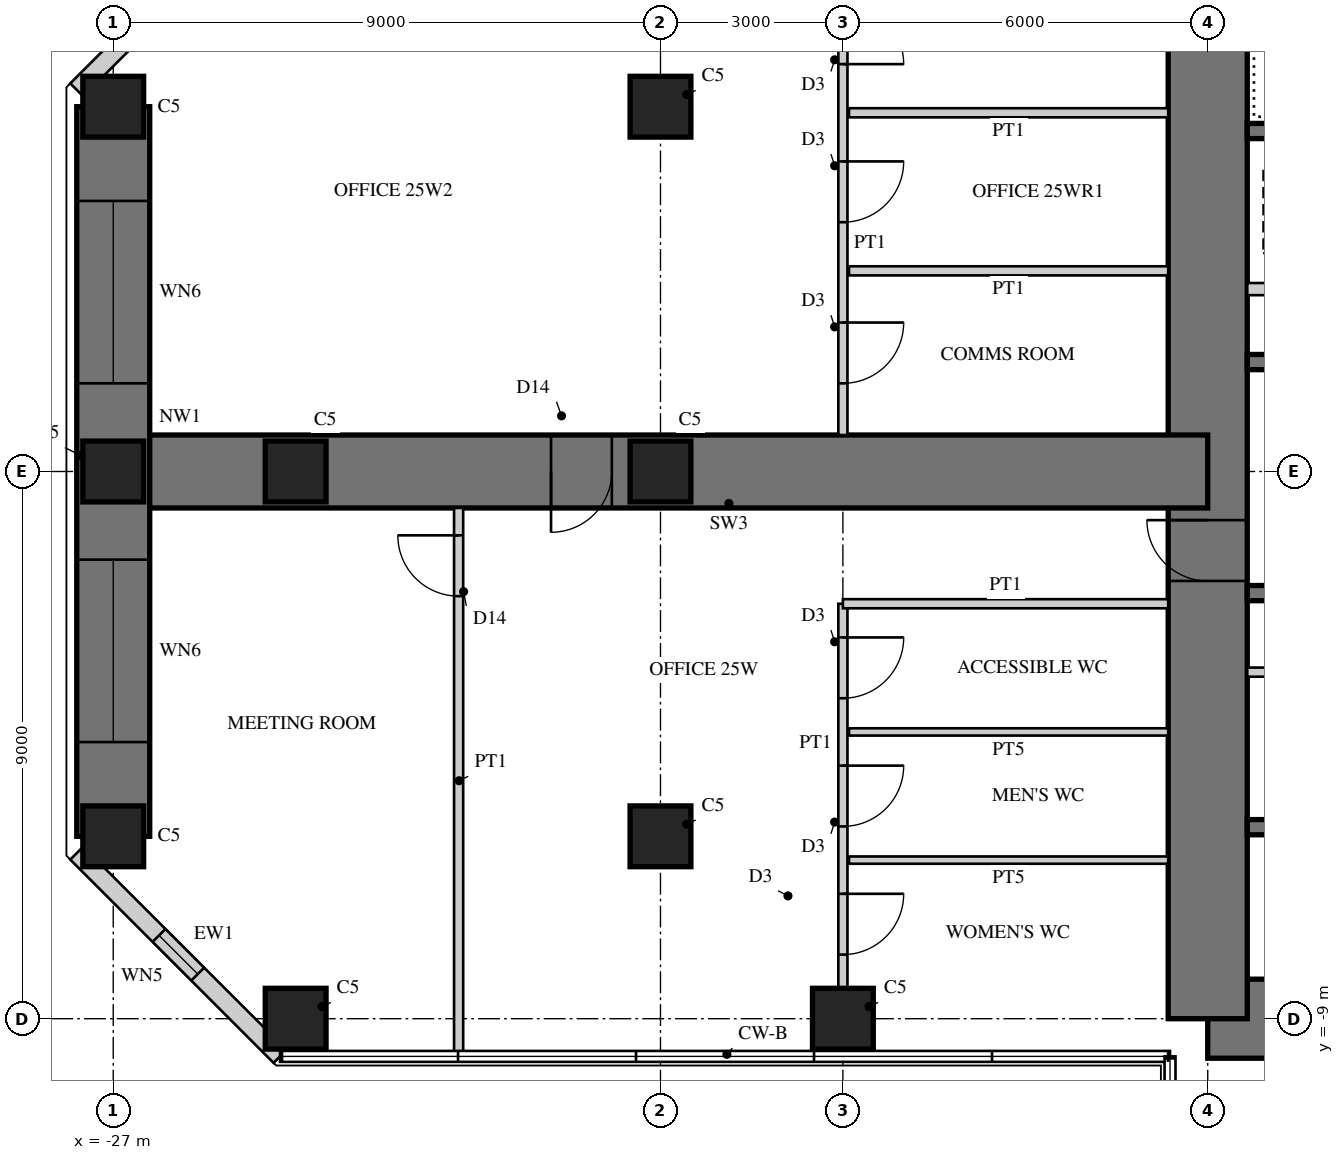
"""IFC4 building model, lengths in metres.
Left out: names, types, materials, properties, quantities, classifications, styles, units other than length and angle.
Written with IfcOpenShell. Run it as: python <this file> out.ifc"""

import sys

from ifc_helpers import new_model, si_unit, direction, frame, frame_2d, origin, origin_2d, place, context, subcontext, project, spatial, rectangle, hollow_rectangle, extrude, element, fill, save


model = new_model("IFC4")
c1 = context("Model", 3, precision=1e-05, world=origin(), true_north=direction((0.0, 1.0)))
c2 = subcontext(c1, "Body", "Model", "MODEL_VIEW")
j1 = project(units=[si_unit("LENGTHUNIT", "METRE"), si_unit("PLANEANGLEUNIT", "RADIAN")], contexts=[c1])
p1 = place(None, origin())
s1 = spatial("IfcSite", under=j1, at=p1, CompositionType="ELEMENT")
p2 = place(p1, origin())
s2 = spatial("IfcBuilding", under=s1, at=p2, CompositionType="ELEMENT")
p3 = place(p2, frame((0.0, 0.0, 104.5)))
s3 = spatial("IfcBuildingStorey", under=s2, at=p3, CompositionType="ELEMENT", Elevation=104.5)
p4 = place(p3, frame((-9.0, -9.0, 0.0), z_axis=(0.0, 0.0, 1.0), x_axis=(1.0, 0.0, 0.0)))
e1 = element("IfcWall", 1, at=p4, inside=s3, PredefinedType="SHEAR", context=c2, shape_type="SweptSolid", body=[
    extrude(rectangle(XDim=18.0, YDim=1.3, at=frame_2d((9.0, 0.0))), origin(), (0.0, 0.0, 1.0), 4.0),
])
p5 = place(p4, frame((9.8, 0.0, 0.0)))
e2 = element("IfcOpeningElement", 2, at=p5, cuts=e1, PredefinedType="OPENING", context=c2, shape_type="SweptSolid", body=[
    extrude(rectangle(XDim=1.0, YDim=2.4, at=frame_2d((0.5, 1.2))), frame((0.0, 0.66, 0.0), z_axis=(0.0, -1.0, 0.0), x_axis=(1.0, 0.0, 0.0)), (0.0, 0.0, 1.0), 1.32),
])
p6 = place(p3, frame((-9.0, 9.0, 0.0), z_axis=(0.0, 0.0, 1.0), x_axis=(0.0, -1.0, 0.0)))
e3 = element("IfcWall", 3, at=p6, inside=s3, PredefinedType="SHEAR", context=c2, shape_type="SweptSolid", body=[
    extrude(rectangle(XDim=18.0, YDim=1.3, at=frame_2d((9.0, 0.0))), origin(), (0.0, 0.0, 1.0), 4.0),
])
p7 = place(p6, frame((9.8, 0.0, 0.0)))
e4 = element("IfcOpeningElement", 4, at=p7, cuts=e3, PredefinedType="OPENING", context=c2, shape_type="SweptSolid", body=[
    extrude(rectangle(XDim=1.0, YDim=2.4, at=frame_2d((0.5, 1.2))), frame((0.0, 0.66, 0.0), z_axis=(0.0, -1.0, 0.0), x_axis=(1.0, 0.0, 0.0)), (0.0, 0.0, 1.0), 1.32),
])
p8 = place(p3, frame((-2.125, 1.8, 0.0), z_axis=(0.0, 0.0, 1.0), x_axis=(-1.0, 0.0, 0.0)))
e5 = element("IfcWall", 5, at=p8, inside=s3, PredefinedType="SHEAR", context=c2, shape_type="SweptSolid", body=[
    extrude(rectangle(XDim=6.225, YDim=0.25, at=frame_2d((3.113, 0.0))), origin(), (0.0, 0.0, 1.0), 4.0),
])
p9 = place(p3, frame((-2.125, 5.6, 0.0), z_axis=(0.0, 0.0, 1.0), x_axis=(-1.0, 0.0, 0.0)))
e6 = element("IfcWall", 6, at=p9, inside=s3, PredefinedType="SHEAR", context=c2, shape_type="SweptSolid", body=[
    extrude(rectangle(XDim=6.225, YDim=0.25, at=frame_2d((3.113, 0.0))), origin(), (0.0, 0.0, 1.0), 4.0),
])
p10 = place(p9, frame((0.175, 0.0, 0.0)))
e7 = element("IfcOpeningElement", 7, at=p10, cuts=e6, PredefinedType="OPENING", context=c2, shape_type="SweptSolid", body=[
    extrude(rectangle(XDim=1.0, YDim=2.1, at=frame_2d((0.5, 1.05))), frame((0.0, 0.135, 0.0), z_axis=(0.0, -1.0, 0.0), x_axis=(1.0, 0.0, 0.0)), (0.0, 0.0, 1.0), 0.27),
])
p11 = place(p3, frame((-5.725, 3.0, 0.0), z_axis=(0.0, 0.0, 1.0), x_axis=(-1.0, 0.0, 0.0)))
e8 = element("IfcWall", 8, at=p11, inside=s3, PredefinedType="PARTITIONING", context=c2, shape_type="SweptSolid", body=[
    extrude(rectangle(XDim=2.625, YDim=0.2, at=frame_2d((1.312, 0.0))), origin(), (0.0, 0.0, 1.0), 4.0),
])
for number, where, z_axis, x_axis in (
    (9, (-1.925, -2.0, 0.0), (0.0, 0.0, 1.0), (-1.0, 0.0, 0.0)),
    (10, (-1.925, -5.85, 0.0), (0.0, 0.0, 1.0), (-1.0, 0.0, 0.0)),
):
    element("IfcWall", number, at=place(p3, frame(where, z_axis=z_axis, x_axis=x_axis)), inside=s3, PredefinedType="SHEAR", context=c2, shape_type="SweptSolid", body=[
        extrude(rectangle(XDim=6.425, YDim=0.25, at=frame_2d((3.212, 0.0))), origin(), (0.0, 0.0, 1.0), 4.0),
    ])
p12 = place(p3, frame((-1.925, -3.3, 0.0), z_axis=(0.0, 0.0, 1.0), x_axis=(-1.0, 0.0, 0.0)))
e11 = element("IfcWall", 11, at=p12, inside=s3, PredefinedType="PARTITIONING", context=c2, shape_type="SweptSolid", body=[
    extrude(rectangle(XDim=6.425, YDim=0.15, at=frame_2d((3.212, 0.0))), origin(), (0.0, 0.0, 1.0), 4.0),
])
p13 = place(p12, frame((0.075, 0.0, 0.0)))
e12 = element("IfcOpeningElement", 12, at=p13, cuts=e11, PredefinedType="OPENING", context=c2, shape_type="SweptSolid", body=[
    extrude(rectangle(XDim=0.8, YDim=2.1, at=frame_2d((0.4, 1.05))), frame((0.0, 0.085, 0.0), z_axis=(0.0, -1.0, 0.0), x_axis=(1.0, 0.0, 0.0)), (0.0, 0.0, 1.0), 0.17),
])
p14 = place(p12, frame((3.675, 0.0, 0.0)))
e13 = element("IfcOpeningElement", 13, at=p14, cuts=e11, PredefinedType="OPENING", context=c2, shape_type="SweptSolid", body=[
    extrude(rectangle(XDim=0.8, YDim=2.1, at=frame_2d((0.4, 1.05))), frame((0.0, 0.085, 0.0), z_axis=(0.0, -1.0, 0.0), x_axis=(1.0, 0.0, 0.0)), (0.0, 0.0, 1.0), 0.17),
])
p15 = place(p3, frame((-9.0, 0.0, 0.0), z_axis=(0.0, 0.0, 1.0), x_axis=(-1.0, 0.0, 0.0)))
e14 = element("IfcWall", 14, at=p15, inside=s3, PredefinedType="SHEAR", context=c2, shape_type="SweptSolid", body=[
    extrude(rectangle(XDim=18.0, YDim=1.2, at=frame_2d((9.0, 0.0))), origin(), (0.0, 0.0, 1.0), 4.0),
])
p16 = place(p15, frame((9.8, 0.0, 0.0)))
e15 = element("IfcOpeningElement", 15, at=p16, cuts=e14, PredefinedType="OPENING", context=c2, shape_type="SweptSolid", body=[
    extrude(rectangle(XDim=1.0, YDim=2.2, at=frame_2d((0.5, 1.1))), frame((0.0, 0.61, 0.0), z_axis=(0.0, -1.0, 0.0), x_axis=(1.0, 0.0, 0.0)), (0.0, 0.0, 1.0), 1.22),
])
p17 = place(p3, frame((-27.0, 6.0, 0.0), z_axis=(0.0, 0.0, 1.0), x_axis=(0.0, -1.0, 0.0)))
e16 = element("IfcWall", 16, at=p17, inside=s3, PredefinedType="SHEAR", context=c2, shape_type="SweptSolid", body=[
    extrude(rectangle(XDim=12.0, YDim=1.2, at=frame_2d((6.0, 0.0))), origin(), (0.0, 0.0, 1.0), 4.0),
])
p18 = place(p17, frame((1.55, 0.0, 0.6)))
e17 = element("IfcOpeningElement", 17, at=p18, cuts=e16, PredefinedType="OPENING", context=c2, shape_type="SweptSolid", body=[
    extrude(rectangle(XDim=3.0, YDim=2.4, at=frame_2d((1.5, 1.2))), frame((0.0, 0.61, 0.0), z_axis=(0.0, -1.0, 0.0), x_axis=(1.0, 0.0, 0.0)), (0.0, 0.0, 1.0), 1.22),
])
p19 = place(p17, frame((7.45, 0.0, 0.6)))
e18 = element("IfcOpeningElement", 18, at=p19, cuts=e16, PredefinedType="OPENING", context=c2, shape_type="SweptSolid", body=[
    extrude(rectangle(XDim=3.0, YDim=2.4, at=frame_2d((1.5, 1.2))), frame((0.0, 0.61, 0.0), z_axis=(0.0, -1.0, 0.0), x_axis=(1.0, 0.0, 0.0)), (0.0, 0.0, 1.0), 1.22),
])
for number, where, z_axis, x_axis in (
    (19, (-15.0, -9.0, 0.0), (0.0, 0.0, 1.0), (1.0, 0.0, 0.0)),
    (20, (-24.0, -9.0, 0.0), (0.0, 0.0, 1.0), (1.0, 0.0, 0.0)),
    (21, (-27.0, 6.0, 0.0), (0.0, 0.0, 1.0), (1.0, 0.0, 0.0)),
    (22, (-27.0, 0.0, 0.0), (0.0, 0.0, 1.0), (1.0, 0.0, 0.0)),
    (23, (-27.0, -6.0, 0.0), (0.0, 0.0, 1.0), (1.0, 0.0, 0.0)),
    (24, (-18.0, 6.0, 0.0), (0.0, 0.0, 1.0), (1.0, 0.0, 0.0)),
    (25, (-18.0, 0.0, 0.0), (0.0, 0.0, 1.0), (1.0, 0.0, 0.0)),
    (26, (-18.0, -6.0, 0.0), (0.0, 0.0, 1.0), (1.0, 0.0, 0.0)),
    (27, (-24.0, 0.0, 0.0), (0.0, 0.0, 1.0), (1.0, 0.0, 0.0)),
):
    element("IfcColumn", number, at=place(p3, frame(where, z_axis=z_axis, x_axis=x_axis)), inside=s3, PredefinedType="COLUMN", context=c2, shape_type="SweptSolid", body=[
        extrude(rectangle(XDim=1.0, YDim=1.0, at=origin_2d()), origin(), (0.0, 0.0, 1.0), 4.0),
    ])
p20 = place(p3, frame((-24.257, 9.62, 0.0), z_axis=(0.0, 0.0, 1.0), x_axis=(-0.707106781187, -0.707106781187, 0.0)))
e28 = element("IfcWall", 28, at=p20, inside=s3, PredefinedType="SOLIDWALL", context=c2, shape_type="SweptSolid", body=[
    extrude(rectangle(XDim=4.728, YDim=0.3, at=frame_2d((2.364, 0.0))), origin(), (0.0, 0.0, 1.0), 3.8),
])
p21 = place(p20, frame((1.914, 0.0, 0.3)))
e29 = element("IfcOpeningElement", 29, at=p21, cuts=e28, PredefinedType="OPENING", context=c2, shape_type="SweptSolid", body=[
    extrude(rectangle(XDim=0.9, YDim=2.4, at=frame_2d((0.45, 1.2))), frame((0.0, 0.16, 0.0), z_axis=(0.0, -1.0, 0.0), x_axis=(1.0, 0.0, 0.0)), (0.0, 0.0, 1.0), 0.32),
])
p22 = place(p3, frame((-27.6, -6.277, 0.0), z_axis=(0.0, 0.0, 1.0), x_axis=(0.707106781187, -0.707106781187, 0.0)))
e30 = element("IfcWall", 30, at=p22, inside=s3, PredefinedType="SOLIDWALL", context=c2, shape_type="SweptSolid", body=[
    extrude(rectangle(XDim=4.728, YDim=0.3, at=frame_2d((2.364, 0.0))), origin(), (0.0, 0.0, 1.0), 3.8),
])
p23 = place(p22, frame((1.914, 0.0, 0.3)))
e31 = element("IfcOpeningElement", 31, at=p23, cuts=e30, PredefinedType="OPENING", context=c2, shape_type="SweptSolid", body=[
    extrude(rectangle(XDim=0.9, YDim=2.4, at=frame_2d((0.45, 1.2))), frame((0.0, 0.16, 0.0), z_axis=(0.0, -1.0, 0.0), x_axis=(1.0, 0.0, 0.0)), (0.0, 0.0, 1.0), 0.32),
])
p24 = place(p3, frame((-15.0, -2.175, 0.0), z_axis=(0.0, 0.0, 1.0), x_axis=(0.0, -1.0, 0.0)))
e32 = element("IfcWall", 32, at=p24, inside=s3, PredefinedType="PARTITIONING", context=c2, shape_type="SweptSolid", body=[
    extrude(rectangle(XDim=6.325, YDim=0.15, at=frame_2d((3.163, 0.0))), origin(), (0.0, 0.0, 1.0), 3.0),
])
p25 = place(p24, frame((0.554, 0.0, 0.0)))
e33 = element("IfcOpeningElement", 33, at=p25, cuts=e32, PredefinedType="OPENING", context=c2, shape_type="SweptSolid", body=[
    extrude(rectangle(XDim=1.0, YDim=2.1, at=frame_2d((0.5, 1.05))), frame((0.0, 0.085, 0.0), z_axis=(0.0, -1.0, 0.0), x_axis=(1.0, 0.0, 0.0)), (0.0, 0.0, 1.0), 0.17),
])
p26 = place(p24, frame((2.663, 0.0, 0.0)))
e34 = element("IfcOpeningElement", 34, at=p26, cuts=e32, PredefinedType="OPENING", context=c2, shape_type="SweptSolid", body=[
    extrude(rectangle(XDim=1.0, YDim=2.1, at=frame_2d((0.5, 1.05))), frame((0.0, 0.085, 0.0), z_axis=(0.0, -1.0, 0.0), x_axis=(1.0, 0.0, 0.0)), (0.0, 0.0, 1.0), 0.17),
])
p27 = place(p24, frame((4.771, 0.0, 0.0)))
e35 = element("IfcOpeningElement", 35, at=p27, cuts=e32, PredefinedType="OPENING", context=c2, shape_type="SweptSolid", body=[
    extrude(rectangle(XDim=1.0, YDim=2.1, at=frame_2d((0.5, 1.05))), frame((0.0, 0.085, 0.0), z_axis=(0.0, -1.0, 0.0), x_axis=(1.0, 0.0, 0.0)), (0.0, 0.0, 1.0), 0.17),
])
p28 = place(p3, frame((-9.65, -2.175, 0.0), z_axis=(0.0, 0.0, 1.0), x_axis=(-1.0, 0.0, 0.0)))
e36 = element("IfcWall", 36, at=p28, inside=s3, PredefinedType="PARTITIONING", context=c2, shape_type="SweptSolid", body=[
    extrude(rectangle(XDim=5.35, YDim=0.15, at=frame_2d((2.675, 0.0))), origin(), (0.0, 0.0, 1.0), 3.8),
])
for number, where, z_axis, x_axis in (
    (37, (-9.65, -4.283, 0.0), (0.0, 0.0, 1.0), (-1.0, 0.0, 0.0)),
    (38, (-9.65, -6.392, 0.0), (0.0, 0.0, 1.0), (-1.0, 0.0, 0.0)),
):
    element("IfcWall", number, at=place(p3, frame(where, z_axis=z_axis, x_axis=x_axis)), inside=s3, PredefinedType="PLUMBINGWALL", context=c2, shape_type="SweptSolid", body=[
        extrude(rectangle(XDim=5.25, YDim=0.12, at=frame_2d((2.625, 0.0))), origin(), (0.0, 0.0, 1.0), 3.8),
    ])
p29 = place(p3, frame((-15.0, 8.5, 0.0), z_axis=(0.0, 0.0, 1.0), x_axis=(0.0, -1.0, 0.0)))
e39 = element("IfcWall", 39, at=p29, inside=s3, PredefinedType="PARTITIONING", context=c2, shape_type="SweptSolid", body=[
    extrude(rectangle(XDim=7.9, YDim=0.15, at=frame_2d((3.95, 0.0))), origin(), (0.0, 0.0, 1.0), 3.0),
])
p30 = place(p29, frame((0.8, 0.0, 0.0)))
e40 = element("IfcOpeningElement", 40, at=p30, cuts=e39, PredefinedType="OPENING", context=c2, shape_type="SweptSolid", body=[
    extrude(rectangle(XDim=1.0, YDim=2.1, at=frame_2d((0.5, 1.05))), frame((0.0, 0.085, 0.0), z_axis=(0.0, -1.0, 0.0), x_axis=(1.0, 0.0, 0.0)), (0.0, 0.0, 1.0), 0.17),
])
p31 = place(p29, frame((3.4, 0.0, 0.0)))
e41 = element("IfcOpeningElement", 41, at=p31, cuts=e39, PredefinedType="OPENING", context=c2, shape_type="SweptSolid", body=[
    extrude(rectangle(XDim=1.0, YDim=2.1, at=frame_2d((0.5, 1.05))), frame((0.0, 0.085, 0.0), z_axis=(0.0, -1.0, 0.0), x_axis=(1.0, 0.0, 0.0)), (0.0, 0.0, 1.0), 0.17),
])
p32 = place(p29, frame((6.05, 0.0, 0.0)))
e42 = element("IfcOpeningElement", 42, at=p32, cuts=e39, PredefinedType="OPENING", context=c2, shape_type="SweptSolid", body=[
    extrude(rectangle(XDim=1.0, YDim=2.1, at=frame_2d((0.5, 1.05))), frame((0.0, 0.085, 0.0), z_axis=(0.0, -1.0, 0.0), x_axis=(1.0, 0.0, 0.0)), (0.0, 0.0, 1.0), 0.17),
])
p33 = place(p3, frame((-9.65, 3.3, 0.0), z_axis=(0.0, 0.0, 1.0), x_axis=(-1.0, 0.0, 0.0)))
e43 = element("IfcWall", 43, at=p33, inside=s3, PredefinedType="PARTITIONING", context=c2, shape_type="SweptSolid", body=[
    extrude(rectangle(XDim=5.25, YDim=0.15, at=frame_2d((2.625, 0.0))), origin(), (0.0, 0.0, 1.0), 3.8),
])
p34 = place(p3, frame((-9.65, 5.9, 0.0), z_axis=(0.0, 0.0, 1.0), x_axis=(-1.0, 0.0, 0.0)))
e44 = element("IfcWall", 44, at=p34, inside=s3, PredefinedType="PARTITIONING", context=c2, shape_type="SweptSolid", body=[
    extrude(rectangle(XDim=5.25, YDim=0.15, at=frame_2d((2.625, 0.0))), origin(), (0.0, 0.0, 1.0), 3.1),
])
p35 = place(p3, frame((-21.32, -0.6, 0.0), z_axis=(0.0, 0.0, 1.0), x_axis=(0.0, -1.0, 0.0)))
e45 = element("IfcWall", 45, at=p35, inside=s3, PredefinedType="PARTITIONING", context=c2, shape_type="SweptSolid", body=[
    extrude(rectangle(XDim=8.98, YDim=0.15, at=frame_2d((4.49, 0.0))), origin(), (0.0, 0.0, 1.0), 3.8),
])
p36 = place(p35, frame((0.45, 0.0, 0.0)))
e46 = element("IfcOpeningElement", 46, at=p36, cuts=e45, PredefinedType="OPENING", context=c2, shape_type="SweptSolid", body=[
    extrude(rectangle(XDim=1.0, YDim=2.2, at=frame_2d((0.5, 1.1))), frame((0.0, 0.085, 0.0), z_axis=(0.0, -1.0, 0.0), x_axis=(1.0, 0.0, 0.0)), (0.0, 0.0, 1.0), 0.17),
])
p37 = place(p18, origin())
e47 = element("IfcWindow", 47, at=p37, inside=s3, PartitioningType="SINGLE_PANEL", PredefinedType="WINDOW", context=c2, shape_type="SweptSolid", body=[
    extrude(hollow_rectangle(XDim=3.0, YDim=2.4, WallThickness=0.06, at=frame_2d((1.5, 1.2))), frame((0.0, 0.03, 0.0), z_axis=(0.0, -1.0, 0.0), x_axis=(1.0, 0.0, 0.0)), (0.0, 0.0, 1.0), 0.06),
    extrude(rectangle(XDim=2.879, YDim=2.279, at=frame_2d((1.5, 1.2))), frame((0.0, 0.03, 0.0), z_axis=(0.0, -1.0, 0.0), x_axis=(1.0, 0.0, 0.0)), (0.0, 0.0, 1.0), 0.06),
])
fill(e17, e47)
p38 = place(p19, origin())
e48 = element("IfcWindow", 48, at=p38, inside=s3, PartitioningType="SINGLE_PANEL", PredefinedType="WINDOW", context=c2, shape_type="SweptSolid", body=[
    extrude(hollow_rectangle(XDim=3.0, YDim=2.4, WallThickness=0.06, at=frame_2d((1.5, 1.2))), frame((0.0, 0.03, 0.0), z_axis=(0.0, -1.0, 0.0), x_axis=(1.0, 0.0, 0.0)), (0.0, 0.0, 1.0), 0.06),
    extrude(rectangle(XDim=2.879, YDim=2.279, at=frame_2d((1.5, 1.2))), frame((0.0, 0.03, 0.0), z_axis=(0.0, -1.0, 0.0), x_axis=(1.0, 0.0, 0.0)), (0.0, 0.0, 1.0), 0.06),
])
fill(e18, e48)
p39 = place(p23, origin())
e49 = element("IfcWindow", 49, at=p39, inside=s3, PartitioningType="SINGLE_PANEL", PredefinedType="WINDOW", context=c2, shape_type="SweptSolid", body=[
    extrude(hollow_rectangle(XDim=0.9, YDim=2.4, WallThickness=0.06, at=frame_2d((0.45, 1.2))), frame((0.0, 0.03, 0.0), z_axis=(0.0, -1.0, 0.0), x_axis=(1.0, 0.0, 0.0)), (0.0, 0.0, 1.0), 0.06),
    extrude(rectangle(XDim=0.779, YDim=2.279, at=frame_2d((0.45, 1.2))), frame((0.0, 0.03, 0.0), z_axis=(0.0, -1.0, 0.0), x_axis=(1.0, 0.0, 0.0)), (0.0, 0.0, 1.0), 0.06),
])
fill(e31, e49)
p40 = place(p25, origin())
e50 = element("IfcDoor", 50, at=p40, inside=s3, OperationType="SINGLE_SWING_LEFT", PredefinedType="DOOR", context=c2, shape_type="SweptSolid", body=[
    extrude(rectangle(XDim=1.0, YDim=2.1, at=frame_2d((0.5, 1.05))), frame((0.0, 0.025, 0.0), z_axis=(0.0, -1.0, 0.0), x_axis=(1.0, 0.0, 0.0)), (0.0, 0.0, 1.0), 0.05),
])
fill(e33, e50)
p41 = place(p26, origin())
e51 = element("IfcDoor", 51, at=p41, inside=s3, OperationType="SINGLE_SWING_LEFT", PredefinedType="DOOR", context=c2, shape_type="SweptSolid", body=[
    extrude(rectangle(XDim=1.0, YDim=2.1, at=frame_2d((0.5, 1.05))), frame((0.0, 0.025, 0.0), z_axis=(0.0, -1.0, 0.0), x_axis=(1.0, 0.0, 0.0)), (0.0, 0.0, 1.0), 0.05),
])
fill(e34, e51)
p42 = place(p27, origin())
e52 = element("IfcDoor", 52, at=p42, inside=s3, OperationType="SINGLE_SWING_LEFT", PredefinedType="DOOR", context=c2, shape_type="SweptSolid", body=[
    extrude(rectangle(XDim=1.0, YDim=2.1, at=frame_2d((0.5, 1.05))), frame((0.0, 0.025, 0.0), z_axis=(0.0, -1.0, 0.0), x_axis=(1.0, 0.0, 0.0)), (0.0, 0.0, 1.0), 0.05),
])
fill(e35, e52)
p43 = place(p30, origin())
e53 = element("IfcDoor", 53, at=p43, inside=s3, OperationType="SINGLE_SWING_RIGHT", PredefinedType="DOOR", context=c2, shape_type="SweptSolid", body=[
    extrude(rectangle(XDim=1.0, YDim=2.1, at=frame_2d((0.5, 1.05))), frame((0.0, 0.025, 0.0), z_axis=(0.0, -1.0, 0.0), x_axis=(1.0, 0.0, 0.0)), (0.0, 0.0, 1.0), 0.05),
])
fill(e40, e53)
p44 = place(p31, origin())
e54 = element("IfcDoor", 54, at=p44, inside=s3, OperationType="SINGLE_SWING_LEFT", PredefinedType="DOOR", context=c2, shape_type="SweptSolid", body=[
    extrude(rectangle(XDim=1.0, YDim=2.1, at=frame_2d((0.5, 1.05))), frame((0.0, 0.025, 0.0), z_axis=(0.0, -1.0, 0.0), x_axis=(1.0, 0.0, 0.0)), (0.0, 0.0, 1.0), 0.05),
])
fill(e41, e54)
p45 = place(p32, origin())
e55 = element("IfcDoor", 55, at=p45, inside=s3, OperationType="SINGLE_SWING_LEFT", PredefinedType="DOOR", context=c2, shape_type="SweptSolid", body=[
    extrude(rectangle(XDim=1.0, YDim=2.1, at=frame_2d((0.5, 1.05))), frame((0.0, 0.025, 0.0), z_axis=(0.0, -1.0, 0.0), x_axis=(1.0, 0.0, 0.0)), (0.0, 0.0, 1.0), 0.05),
])
fill(e42, e55)
p46 = place(p36, frame((1.0, 0.0, 0.0), z_axis=(0.0, 0.0, 1.0), x_axis=(-1.0, 0.0, 0.0)))
e56 = element("IfcDoor", 56, at=p46, inside=s3, OperationType="SINGLE_SWING_RIGHT", PredefinedType="DOOR", context=c2, shape_type="SweptSolid", body=[
    extrude(rectangle(XDim=1.0, YDim=2.2, at=frame_2d((0.5, 1.1))), frame((0.0, 0.025, 0.0), z_axis=(0.0, -1.0, 0.0), x_axis=(1.0, 0.0, 0.0)), (0.0, 0.0, 1.0), 0.05),
])
fill(e46, e56)
p47 = place(p16, origin())
e57 = element("IfcDoor", 57, at=p47, inside=s3, OperationType="SINGLE_SWING_RIGHT", PredefinedType="DOOR", context=c2, shape_type="SweptSolid", body=[
    extrude(rectangle(XDim=1.0, YDim=2.2, at=frame_2d((0.5, 1.1))), frame((0.0, 0.025, 0.0), z_axis=(0.0, -1.0, 0.0), x_axis=(1.0, 0.0, 0.0)), (0.0, 0.0, 1.0), 0.05),
])
fill(e15, e57)
p48 = place(p7, frame((1.0, 0.0, 0.0), z_axis=(0.0, 0.0, 1.0), x_axis=(-1.0, 0.0, 0.0)))
e58 = element("IfcDoor", 58, at=p48, inside=s3, OperationType="SINGLE_SWING_RIGHT", PredefinedType="DOOR", context=c2, shape_type="SweptSolid", body=[
    extrude(rectangle(XDim=1.0, YDim=2.4, at=frame_2d((0.5, 1.2))), frame((0.0, -0.005, 0.0), z_axis=(0.0, -1.0, 0.0), x_axis=(1.0, 0.0, 0.0)), (0.0, 0.0, 1.0), 0.05),
])
fill(e4, e58)
save(model, sys.argv[1])
